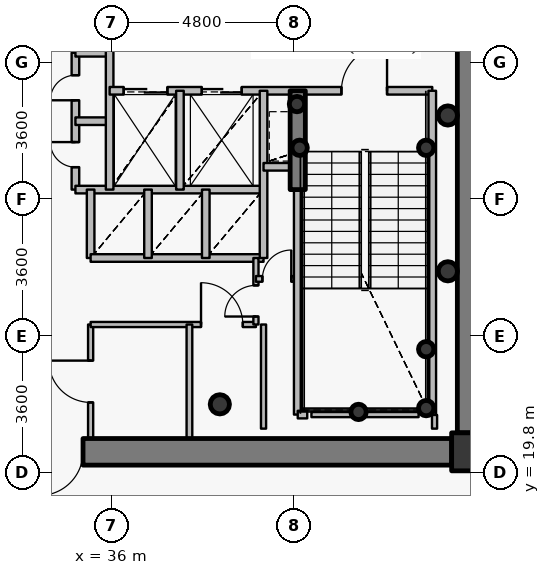
"""IFC4 building model, lengths in metres.
Left out: names, types, materials, properties, quantities, classifications, styles, units other than length and angle.
Written with IfcOpenShell. Run it as: python <this file> out.ifc"""

import sys

from ifc_helpers import new_model, si_unit, direction, frame, frame_2d, origin, origin_2d, place, context, subcontext, project, spatial, rectangle, hollow_circle, extrude, source, transform, mapped, element, fill, save


model = new_model("IFC4")
c1 = context("Model", 3, precision=1e-05, world=origin(), true_north=direction((0.0, 1.0)))
c2 = subcontext(c1, "Body", "Model", "MODEL_VIEW")
j1 = project(units=[si_unit("LENGTHUNIT", "METRE"), si_unit("PLANEANGLEUNIT", "RADIAN")], contexts=[c1])
p1 = place(None, origin())
s1 = spatial("IfcSite", under=j1, at=p1, CompositionType="ELEMENT")
p2 = place(p1, origin())
s2 = spatial("IfcBuilding", under=s1, at=p2, CompositionType="ELEMENT")
p3 = place(p2, frame((0.0, 0.0, 221.55)))
s3 = spatial("IfcBuildingStorey", under=s2, at=p3, CompositionType="ELEMENT", Elevation=221.55)
p4 = place(p3, frame((45.45, 20.35, 0.0), z_axis=(0.0, 0.0, 1.0), x_axis=(1.0, 0.0, 0.0)))
e1 = element("IfcColumn", 1, at=p4, inside=s3, PredefinedType="COLUMN", context=c2, shape_type="SweptSolid", body=[
    extrude(rectangle(XDim=1.0, YDim=1.0, at=origin_2d()), origin(), (0.0, 0.0, 1.0), 3.75),
])
p5 = place(p3, frame((38.85, 21.6, 0.0), z_axis=(0.0, 0.0, 1.0), x_axis=(1.0, 0.0, 0.0)))
e2 = element("IfcColumn", 2, at=p5, inside=s3, PredefinedType="COLUMN", context=c2, shape_type="SweptSolid", body=[
    extrude(hollow_circle(Radius=0.254, WallThickness=0.02, at=origin_2d()), origin(), (0.0, 0.0, 1.0), 3.75),
])
for number, where, z_axis, x_axis in (
    (3, (44.28, 21.5, 0.0), (0.0, 0.0, 1.0), (1.0, 0.0, 0.0)),
    (4, (44.28, 23.05, 0.0), (0.0, 0.0, 1.0), (1.0, 0.0, 0.0)),
    (5, (42.5, 21.4, 0.0), (0.0, 0.0, 1.0), (1.0, 0.0, 0.0)),
    (6, (40.95, 28.35, 0.0), (0.0, 0.0, 1.0), (1.0, 0.0, 0.0)),
    (7, (44.28, 28.35, 0.0), (0.0, 0.0, 1.0), (1.0, 0.0, 0.0)),
    (8, (40.88, 29.5, 0.0), (0.0, 0.0, 1.0), (1.0, 0.0, 0.0)),
):
    element("IfcColumn", number, at=place(p3, frame(where, z_axis=z_axis, x_axis=x_axis)), inside=s3, PredefinedType="COLUMN", context=c2, shape_type="SweptSolid", body=[
        extrude(hollow_circle(Radius=0.203, WallThickness=0.016, at=origin_2d()), origin(), (0.0, 0.0, 1.0), 3.75),
    ])
p6 = place(p3, frame((45.45, 33.15, 0.0), z_axis=(0.0, 0.0, 1.0), x_axis=(0.0, -1.0, 0.0)))
e9 = element("IfcWall", 9, at=p6, inside=s3, PredefinedType="SHEAR", context=c2, shape_type="SweptSolid", body=[
    extrude(rectangle(XDim=12.3, YDim=0.7, at=frame_2d((6.15, 0.0))), origin(), (0.0, 0.0, 1.0), 3.05),
])
p7 = place(p3, frame((44.95, 20.35, 0.0), z_axis=(0.0, 0.0, 1.0), x_axis=(-1.0, 0.0, 0.0)))
e10 = element("IfcWall", 10, at=p7, inside=s3, PredefinedType="SHEAR", context=c2, shape_type="SweptSolid", body=[
    extrude(rectangle(XDim=17.9, YDim=0.7, at=frame_2d((8.95, 0.0))), origin(), (0.0, 0.0, 1.0), 3.05),
])
p8 = place(p7, frame((9.7, 0.0, 0.0)))
e11 = element("IfcOpeningElement", 11, at=p8, cuts=e10, PredefinedType="OPENING", context=c2, shape_type="SweptSolid", body=[
    extrude(rectangle(XDim=1.15, YDim=2.15, at=origin_2d()), frame((0.575, 0.36, 1.075), z_axis=(0.0, -1.0, 0.0), x_axis=(1.0, 0.0, 0.0)), (0.0, 0.0, 1.0), 0.72),
])
p9 = place(p3, frame((40.9, 27.25, 0.0), z_axis=(0.0, 0.0, 1.0), x_axis=(0.0, 1.0, 0.0)))
e12 = element("IfcWall", 12, at=p9, inside=s3, PredefinedType="SHEAR", context=c2, shape_type="SweptSolid", body=[
    extrude(rectangle(XDim=2.6, YDim=0.4, at=frame_2d((1.3, 0.0))), origin(), (0.0, 0.0, 1.0), 3.1),
])
for number, where, z_axis, x_axis in (
    (13, (44.85, 25.1, 0.0), (0.0, 0.0, 1.0), (1.0, 0.0, 0.0)),
    (14, (44.85, 29.2, 0.0), (0.0, 0.0, 1.0), (1.0, 0.0, 0.0)),
):
    element("IfcColumn", number, at=place(p3, frame(where, z_axis=z_axis, x_axis=x_axis)), inside=s3, PredefinedType="COLUMN", context=c2, shape_type="SweptSolid", body=[
        extrude(hollow_circle(Radius=0.254, WallThickness=0.02, at=origin_2d()), origin(), (0.0, 0.0, 1.0), 3.75),
    ])
p10 = place(p3, frame((35.05, 27.25, 0.0), z_axis=(0.0, 0.0, 1.0), x_axis=(0.0, 1.0, 0.0)))
e15 = element("IfcWall", 15, at=p10, inside=s3, PredefinedType="PARTITIONING", context=c2, shape_type="SweptSolid", body=[
    extrude(rectangle(XDim=3.6, YDim=0.2, at=frame_2d((1.8, 0.0))), origin(), (0.0, 0.0, 1.0), 3.5),
])
p11 = place(p10, frame((0.59, 0.0, 0.0)))
e16 = element("IfcOpeningElement", 16, at=p11, cuts=e15, PredefinedType="OPENING", context=c2, shape_type="SweptSolid", body=[
    extrude(rectangle(XDim=0.66, YDim=2.05, at=origin_2d()), frame((0.33, 0.11, 1.025), z_axis=(0.0, -1.0, 0.0), x_axis=(1.0, 0.0, 0.0)), (0.0, 0.0, 1.0), 0.22),
])
p12 = place(p10, frame((2.35, 0.0, 0.0)))
e17 = element("IfcOpeningElement", 17, at=p12, cuts=e15, PredefinedType="OPENING", context=c2, shape_type="SweptSolid", body=[
    extrude(rectangle(XDim=0.66, YDim=2.05, at=origin_2d()), frame((0.33, 0.11, 1.025), z_axis=(0.0, -1.0, 0.0), x_axis=(1.0, 0.0, 0.0)), (0.0, 0.0, 1.0), 0.22),
])
p13 = place(p3, frame((35.05, 27.25, 0.0), z_axis=(0.0, 0.0, 1.0), x_axis=(1.0, 0.0, 0.0)))
e18 = element("IfcWall", 18, at=p13, inside=s3, PredefinedType="PARTITIONING", context=c2, shape_type="SweptSolid", body=[
    extrude(rectangle(XDim=4.95, YDim=0.2, at=frame_2d((2.475, 0.0))), origin(), (0.0, 0.0, 1.0), 3.085),
])
for number, where, z_axis, x_axis in (
    (19, (35.05, 29.05, 0.0), (0.0, 0.0, 1.0), (1.0, 0.0, 0.0)),
    (20, (35.05, 30.85, 0.0), (0.0, 0.0, 1.0), (1.0, 0.0, 0.0)),
):
    element("IfcWall", number, at=place(p3, frame(where, z_axis=z_axis, x_axis=x_axis)), inside=s3, PredefinedType="PARTITIONING", context=c2, shape_type="SweptSolid", body=[
        extrude(rectangle(XDim=0.9, YDim=0.2, at=frame_2d((0.45, 0.0))), origin(), (0.0, 0.0, 1.0), 3.5),
    ])
p14 = place(p3, frame((35.45, 20.7, 0.0), z_axis=(0.0, 0.0, 1.0), x_axis=(0.0, 1.0, 0.0)))
e21 = element("IfcWall", 21, at=p14, inside=s3, PredefinedType="PARTITIONING", context=c2, shape_type="SweptSolid", body=[
    extrude(rectangle(XDim=3.0, YDim=0.135, at=frame_2d((1.5, 0.0))), origin(), (0.0, 0.0, 1.0), 3.085),
])
p15 = place(p14, frame((0.95, 0.0, 0.0)))
e22 = element("IfcOpeningElement", 22, at=p15, cuts=e21, PredefinedType="OPENING", context=c2, shape_type="SweptSolid", body=[
    extrude(rectangle(XDim=1.1, YDim=2.15, at=origin_2d()), frame((0.55, 0.078, 1.075), z_axis=(0.0, -1.0, 0.0), x_axis=(1.0, 0.0, 0.0)), (0.0, 0.0, 1.0), 0.155),
])
p16 = place(p3, frame((35.45, 23.7, 0.0), z_axis=(0.0, 0.0, 1.0), x_axis=(1.0, 0.0, 0.0)))
e23 = element("IfcWall", 23, at=p16, inside=s3, PredefinedType="PARTITIONING", context=c2, shape_type="SweptSolid", body=[
    extrude(rectangle(XDim=4.35, YDim=0.135, at=frame_2d((2.175, 0.0))), origin(), (0.0, 0.0, 1.0), 3.085),
])
p17 = place(p16, frame((2.905, 0.0, 0.0)))
e24 = element("IfcOpeningElement", 24, at=p17, cuts=e23, PredefinedType="OPENING", context=c2, shape_type="SweptSolid", body=[
    extrude(rectangle(XDim=1.1, YDim=2.15, at=origin_2d()), frame((0.55, 0.078, 1.075), z_axis=(0.0, -1.0, 0.0), x_axis=(1.0, 0.0, 0.0)), (0.0, 0.0, 1.0), 0.155),
])
p18 = place(p3, frame((35.45, 25.45, 0.0), z_axis=(0.0, 0.0, 1.0), x_axis=(0.0, 1.0, 0.0)))
e25 = element("IfcWall", 25, at=p18, inside=s3, PredefinedType="PARTITIONING", context=c2, shape_type="SweptSolid", body=[
    extrude(rectangle(XDim=1.8, YDim=0.2, at=frame_2d((0.9, 0.0))), origin(), (0.0, 0.0, 1.0), 3.5),
])
p19 = place(p3, frame((35.45, 25.45, 0.0), z_axis=(0.0, 0.0, 1.0), x_axis=(1.0, 0.0, 0.0)))
e26 = element("IfcWall", 26, at=p19, inside=s3, PredefinedType="PARTITIONING", context=c2, shape_type="SweptSolid", body=[
    extrude(rectangle(XDim=4.55, YDim=0.2, at=frame_2d((2.275, 0.0))), origin(), (0.0, 0.0, 1.0), 3.085),
])
p20 = place(p3, frame((35.95, 27.25, 0.0), z_axis=(0.0, 0.0, 1.0), x_axis=(0.0, 1.0, 0.0)))
e27 = element("IfcWall", 27, at=p20, inside=s3, PredefinedType="PARTITIONING", context=c2, shape_type="SweptSolid", body=[
    extrude(rectangle(XDim=3.8, YDim=0.2, at=frame_2d((1.9, 0.0))), origin(), (0.0, 0.0, 1.0), 3.5),
])
p21 = place(p3, frame((35.95, 29.85, 0.0), z_axis=(0.0, 0.0, 1.0), x_axis=(1.0, 0.0, 0.0)))
e28 = element("IfcWall", 28, at=p21, inside=s3, PredefinedType="PARTITIONING", context=c2, shape_type="SweptSolid", body=[
    extrude(rectangle(XDim=8.49, YDim=0.2, at=frame_2d((4.245, 0.0))), origin(), (0.0, 0.0, 1.0), 3.085),
])
p22 = place(p21, frame((6.1, 0.0, 0.0)))
e29 = element("IfcOpeningElement", 29, at=p22, cuts=e28, PredefinedType="OPENING", context=c2, shape_type="SweptSolid", body=[
    extrude(rectangle(XDim=1.2, YDim=2.15, at=origin_2d()), frame((0.6, 0.11, 1.075), z_axis=(0.0, -1.0, 0.0), x_axis=(1.0, 0.0, 0.0)), (0.0, 0.0, 1.0), 0.22),
])
p23 = place(p21, frame((0.37, 0.0, 0.0)))
e30 = element("IfcOpeningElement", 30, at=p23, cuts=e28, PredefinedType="OPENING", context=c2, shape_type="SweptSolid", body=[
    extrude(rectangle(XDim=1.15, YDim=2.15, at=origin_2d()), frame((0.575, 0.11, 1.075), z_axis=(0.0, -1.0, 0.0), x_axis=(1.0, 0.0, 0.0)), (0.0, 0.0, 1.0), 0.22),
])
p24 = place(p21, frame((2.425, 0.0, 0.0)))
e31 = element("IfcOpeningElement", 31, at=p24, cuts=e28, PredefinedType="OPENING", context=c2, shape_type="SweptSolid", body=[
    extrude(rectangle(XDim=1.05, YDim=2.15, at=origin_2d()), frame((0.525, 0.11, 1.075), z_axis=(0.0, -1.0, 0.0), x_axis=(1.0, 0.0, 0.0)), (0.0, 0.0, 1.0), 0.22),
])
p25 = place(p3, frame((36.96, 25.45, 0.0), z_axis=(0.0, 0.0, 1.0), x_axis=(0.0, 1.0, 0.0)))
e32 = element("IfcWall", 32, at=p25, inside=s3, PredefinedType="PARTITIONING", context=c2, shape_type="SweptSolid", body=[
    extrude(rectangle(XDim=1.8, YDim=0.2, at=frame_2d((0.9, 0.0))), origin(), (0.0, 0.0, 1.0), 3.5),
])
p26 = place(p3, frame((37.8, 27.25, 0.0), z_axis=(0.0, 0.0, 1.0), x_axis=(0.0, 1.0, 0.0)))
e33 = element("IfcWall", 33, at=p26, inside=s3, PredefinedType="PARTITIONING", context=c2, shape_type="SweptSolid", body=[
    extrude(rectangle(XDim=2.6, YDim=0.2, at=frame_2d((1.3, 0.0))), origin(), (0.0, 0.0, 1.0), 3.5),
])
p27 = place(p3, frame((38.05, 20.18, 0.0), z_axis=(0.0, 0.0, 1.0), x_axis=(0.0, 1.0, 0.0)))
e34 = element("IfcWall", 34, at=p27, inside=s3, PredefinedType="PARTITIONING", context=c2, shape_type="SweptSolid", body=[
    extrude(rectangle(XDim=3.52, YDim=0.15, at=frame_2d((1.76, 0.0))), origin(), (0.0, 0.0, 1.0), 3.035),
])
p28 = place(p3, frame((38.48, 25.45, 0.0), z_axis=(0.0, 0.0, 1.0), x_axis=(0.0, 1.0, 0.0)))
e35 = element("IfcWall", 35, at=p28, inside=s3, PredefinedType="PARTITIONING", context=c2, shape_type="SweptSolid", body=[
    extrude(rectangle(XDim=1.8, YDim=0.2, at=frame_2d((0.9, 0.0))), origin(), (0.0, 0.0, 1.0), 3.5),
])
p29 = place(p3, frame((39.8, 23.7, 0.0), z_axis=(0.0, 0.0, 1.0), x_axis=(0.0, 1.0, 0.0)))
e36 = element("IfcWall", 36, at=p29, inside=s3, PredefinedType="PARTITIONING", context=c2, shape_type="SweptSolid", body=[
    extrude(rectangle(XDim=1.75, YDim=0.135, at=frame_2d((0.875, 0.0))), origin(), (0.0, 0.0, 1.0), 3.5),
])
p30 = place(p29, frame((0.21, 0.0, 0.0)))
e37 = element("IfcOpeningElement", 37, at=p30, cuts=e36, PredefinedType="OPENING", context=c2, shape_type="SweptSolid", body=[
    extrude(rectangle(XDim=0.82, YDim=2.1, at=origin_2d()), frame((0.41, 0.078, 1.05), z_axis=(0.0, -1.0, 0.0), x_axis=(1.0, 0.0, 0.0)), (0.0, 0.0, 1.0), 0.155),
])
p31 = place(p3, frame((39.8, 24.9, 0.0), z_axis=(0.0, 0.0, 1.0), x_axis=(1.0, 0.0, 0.0)))
e38 = element("IfcWall", 38, at=p31, inside=s3, PredefinedType="PARTITIONING", context=c2, shape_type="SweptSolid", body=[
    extrude(rectangle(XDim=1.1, YDim=0.15, at=frame_2d((0.55, 0.0))), origin(), (0.0, 0.0, 1.0), 3.5),
])
p32 = place(p31, frame((0.17, 0.0, 0.0)))
e39 = element("IfcOpeningElement", 39, at=p32, cuts=e38, PredefinedType="OPENING", context=c2, shape_type="SweptSolid", body=[
    extrude(rectangle(XDim=0.76, YDim=2.1, at=origin_2d()), frame((0.38, 0.085, 1.05), z_axis=(0.0, -1.0, 0.0), x_axis=(1.0, 0.0, 0.0)), (0.0, 0.0, 1.0), 0.17),
])
p33 = place(p3, frame((40.0, 25.45, 0.0), z_axis=(0.0, 0.0, 1.0), x_axis=(0.0, 1.0, 0.0)))
e40 = element("IfcWall", 40, at=p33, inside=s3, PredefinedType="PARTITIONING", context=c2, shape_type="SweptSolid", body=[
    extrude(rectangle(XDim=4.4, YDim=0.2, at=frame_2d((2.2, 0.0))), origin(), (0.0, 0.0, 1.0), 3.5),
])
p34 = place(p3, frame((40.0, 27.85, 0.0), z_axis=(0.0, 0.0, 1.0), x_axis=(1.0, 0.0, 0.0)))
e41 = element("IfcWall", 41, at=p34, inside=s3, PredefinedType="PARTITIONING", context=c2, shape_type="SweptSolid", body=[
    extrude(rectangle(XDim=0.9, YDim=0.2, at=frame_2d((0.45, 0.0))), origin(), (0.0, 0.0, 1.0), 3.5),
])
p35 = place(p3, frame((40.9, 21.33, 0.0), z_axis=(0.0, 0.0, 1.0), x_axis=(0.0, 1.0, 0.0)))
e42 = element("IfcWall", 42, at=p35, inside=s3, PredefinedType="PARTITIONING", context=c2, shape_type="SweptSolid", body=[
    extrude(rectangle(XDim=5.91, YDim=0.2, at=frame_2d((2.955, 0.0))), origin(), (0.0, 0.0, 1.0), 3.035),
])
p36 = place(p3, frame((40.9, 21.33, 0.0), z_axis=(0.0, 0.0, 1.0), x_axis=(1.0, 0.0, 0.0)))
e43 = element("IfcWall", 43, at=p36, inside=s3, PredefinedType="PARTITIONING", context=c2, shape_type="SweptSolid", body=[
    extrude(rectangle(XDim=0.25, YDim=0.2, at=frame_2d((0.125, 0.0))), origin(), (0.0, 0.0, 1.0), 3.035),
])
p37 = place(p3, frame((44.44, 21.33, 0.0), z_axis=(0.0, 0.0, 1.0), x_axis=(0.0, 1.0, 0.0)))
e44 = element("IfcWall", 44, at=p37, inside=s3, PredefinedType="PARTITIONING", context=c2, shape_type="SweptSolid", body=[
    extrude(rectangle(XDim=8.52, YDim=0.2, at=frame_2d((4.26, 0.0))), origin(), (0.0, 0.0, 1.0), 3.5),
])
p38 = place(p3, frame((44.08, 21.33, 0.0), z_axis=(0.0, 0.0, 1.0), x_axis=(-1.0, 0.0, 0.0)))
e45 = element("IfcWall", 45, at=p38, inside=s3, PredefinedType="PARTITIONING", context=c2, shape_type="SweptSolid", body=[
    extrude(rectangle(XDim=2.82, YDim=0.135, at=frame_2d((1.41, 0.0))), origin(), (0.0, 0.0, 1.0), 3.035),
])
p39 = place(p3, frame((40.0, 23.7, 0.0), z_axis=(0.0, 0.0, 1.0), x_axis=(0.0, -1.0, 0.0)))
e46 = element("IfcWall", 46, at=p39, inside=s3, PredefinedType="PARTITIONING", context=c2, shape_type="SweptSolid", body=[
    extrude(rectangle(XDim=2.74, YDim=0.135, at=frame_2d((1.37, 0.0))), origin(), (0.0, 0.0, 1.0), 3.035),
])
p40 = place(p3, frame((44.5, 20.96, 0.0), z_axis=(0.0, 0.0, 1.0), x_axis=(0.0, 1.0, 0.0)))
e47 = element("IfcWall", 47, at=p40, inside=s3, PredefinedType="PARTITIONING", context=c2, shape_type="SweptSolid", body=[
    extrude(rectangle(XDim=0.36, YDim=0.135, at=frame_2d((0.18, 0.0))), origin(), (0.0, 0.0, 1.0), 3.5),
])
p41 = place(p3, frame((44.96, 20.0, 0.0), z_axis=(0.0, 0.0, 1.0), x_axis=(1.0, 0.0, 0.0)))
e48 = element("IfcWall", 48, at=p41, inside=s3, PredefinedType="PARTITIONING", context=c2, shape_type="SweptSolid", body=[
    extrude(rectangle(XDim=0.83, YDim=0.135, at=frame_2d((0.415, 0.0))), origin(), (0.0, 0.0, 1.0), 2.935),
])
m1 = source(origin(), c2, "Body", "SweptSolid", [
    extrude(rectangle(XDim=1.15, YDim=2.15, at=origin_2d()), frame((0.575, 0.025, 1.075), z_axis=(0.0, -1.0, 0.0), x_axis=(1.0, 0.0, 0.0)), (0.0, 0.0, 1.0), 0.05),
])
p42 = place(p8, origin())
e49 = element("IfcDoor", 49, at=p42, inside=s3, OperationType="SINGLE_SWING_RIGHT", PredefinedType="DOOR", context=c2, shape_type="MappedRepresentation", body=[
    mapped(m1, transform((0.0, 0.0, 0.0), x_axis=(1.0, 0.0, 0.0), y_axis=(0.0, 1.0, 0.0), z_axis=(0.0, 0.0, 1.0), scale=1.0)),
])
fill(e11, e49)
m2 = source(origin(), c2, "Body", "SweptSolid", [
    extrude(rectangle(XDim=1.2, YDim=2.15, at=origin_2d()), frame((0.6, 0.025, 1.075), z_axis=(0.0, -1.0, 0.0), x_axis=(1.0, 0.0, 0.0)), (0.0, 0.0, 1.0), 0.05),
])
p43 = place(p22, origin())
e50 = element("IfcDoor", 50, at=p43, inside=s3, OperationType="SINGLE_SWING_RIGHT", PredefinedType="DOOR", context=c2, shape_type="MappedRepresentation", body=[
    mapped(m2, transform((0.0, 0.0, 0.0), x_axis=(1.0, 0.0, 0.0), y_axis=(0.0, 1.0, 0.0), z_axis=(0.0, 0.0, 1.0), scale=1.0)),
])
fill(e29, e50)
m3 = source(origin(), c2, "Body", "SweptSolid", [
    extrude(rectangle(XDim=1.15, YDim=2.15, at=origin_2d()), frame((0.575, 0.025, 1.075), z_axis=(0.0, -1.0, 0.0), x_axis=(1.0, 0.0, 0.0)), (0.0, 0.0, 1.0), 0.05),
])
p44 = place(p23, origin())
e51 = element("IfcDoor", 51, at=p44, inside=s3, OperationType="DOUBLE_DOOR_SLIDING", PredefinedType="USERDEFINED", context=c2, shape_type="MappedRepresentation", body=[
    mapped(m3, transform((0.0, 0.0, 0.0), x_axis=(1.0, 0.0, 0.0), y_axis=(0.0, 1.0, 0.0), z_axis=(0.0, 0.0, 1.0), scale=1.0)),
])
fill(e30, e51)
m4 = source(origin(), c2, "Body", "SweptSolid", [
    extrude(rectangle(XDim=1.05, YDim=2.15, at=origin_2d()), frame((0.525, 0.025, 1.075), z_axis=(0.0, -1.0, 0.0), x_axis=(1.0, 0.0, 0.0)), (0.0, 0.0, 1.0), 0.05),
])
p45 = place(p24, origin())
e52 = element("IfcDoor", 52, at=p45, inside=s3, OperationType="DOUBLE_DOOR_SLIDING", PredefinedType="USERDEFINED", context=c2, shape_type="MappedRepresentation", body=[
    mapped(m4, transform((0.0, 0.0, 0.0), x_axis=(1.0, 0.0, 0.0), y_axis=(0.0, 1.0, 0.0), z_axis=(0.0, 0.0, 1.0), scale=1.0)),
])
fill(e31, e52)
m5 = source(origin(), c2, "Body", "SweptSolid", [
    extrude(rectangle(XDim=0.66, YDim=2.05, at=origin_2d()), frame((0.33, 0.025, 1.025), z_axis=(0.0, -1.0, 0.0), x_axis=(1.0, 0.0, 0.0)), (0.0, 0.0, 1.0), 0.05),
])
p46 = place(p11, origin())
e53 = element("IfcDoor", 53, at=p46, inside=s3, OperationType="SINGLE_SWING_RIGHT", PredefinedType="USERDEFINED", context=c2, shape_type="MappedRepresentation", body=[
    mapped(m5, transform((0.0, 0.0, 0.0), x_axis=(1.0, 0.0, 0.0), y_axis=(0.0, 1.0, 0.0), z_axis=(0.0, 0.0, 1.0), scale=1.0)),
])
fill(e16, e53)
p47 = place(p12, origin())
e54 = element("IfcDoor", 54, at=p47, inside=s3, OperationType="SINGLE_SWING_LEFT", PredefinedType="USERDEFINED", context=c2, shape_type="MappedRepresentation", body=[
    mapped(m5, transform((0.0, 0.0, 0.0), x_axis=(1.0, 0.0, 0.0), y_axis=(0.0, 1.0, 0.0), z_axis=(0.0, 0.0, 1.0), scale=1.0)),
])
fill(e17, e54)
m6 = source(origin(), c2, "Body", "SweptSolid", [
    extrude(rectangle(XDim=1.1, YDim=2.15, at=origin_2d()), frame((0.55, 0.025, 1.075), z_axis=(0.0, -1.0, 0.0), x_axis=(1.0, 0.0, 0.0)), (0.0, 0.0, 1.0), 0.05),
])
p48 = place(p15, origin())
e55 = element("IfcDoor", 55, at=p48, inside=s3, OperationType="SINGLE_SWING_RIGHT", PredefinedType="DOOR", context=c2, shape_type="MappedRepresentation", body=[
    mapped(m6, transform((0.0, 0.0, 0.0), x_axis=(1.0, 0.0, 0.0), y_axis=(0.0, 1.0, 0.0), z_axis=(0.0, 0.0, 1.0), scale=1.0)),
])
fill(e22, e55)
p49 = place(p17, origin())
e56 = element("IfcDoor", 56, at=p49, inside=s3, OperationType="SINGLE_SWING_LEFT", PredefinedType="DOOR", context=c2, shape_type="MappedRepresentation", body=[
    mapped(m6, transform((0.0, 0.0, 0.0), x_axis=(1.0, 0.0, 0.0), y_axis=(0.0, 1.0, 0.0), z_axis=(0.0, 0.0, 1.0), scale=1.0)),
])
fill(e24, e56)
m7 = source(origin(), c2, "Body", "SweptSolid", [
    extrude(rectangle(XDim=0.82, YDim=2.1, at=origin_2d()), frame((0.41, 0.025, 1.05), z_axis=(0.0, -1.0, 0.0), x_axis=(1.0, 0.0, 0.0)), (0.0, 0.0, 1.0), 0.05),
])
p50 = place(p30, origin())
e57 = element("IfcDoor", 57, at=p50, inside=s3, OperationType="SINGLE_SWING_LEFT", PredefinedType="DOOR", context=c2, shape_type="MappedRepresentation", body=[
    mapped(m7, transform((0.0, 0.0, 0.0), x_axis=(1.0, 0.0, 0.0), y_axis=(0.0, 1.0, 0.0), z_axis=(0.0, 0.0, 1.0), scale=1.0)),
])
fill(e37, e57)
m8 = source(origin(), c2, "Body", "SweptSolid", [
    extrude(rectangle(XDim=0.76, YDim=2.1, at=origin_2d()), frame((0.38, 0.025, 1.05), z_axis=(0.0, -1.0, 0.0), x_axis=(1.0, 0.0, 0.0)), (0.0, 0.0, 1.0), 0.05),
])
p51 = place(p32, origin())
e58 = element("IfcDoor", 58, at=p51, inside=s3, OperationType="SINGLE_SWING_RIGHT", PredefinedType="DOOR", context=c2, shape_type="MappedRepresentation", body=[
    mapped(m8, transform((0.0, 0.0, 0.0), x_axis=(1.0, 0.0, 0.0), y_axis=(0.0, 1.0, 0.0), z_axis=(0.0, 0.0, 1.0), scale=1.0)),
])
fill(e39, e58)
save(model, sys.argv[1])
